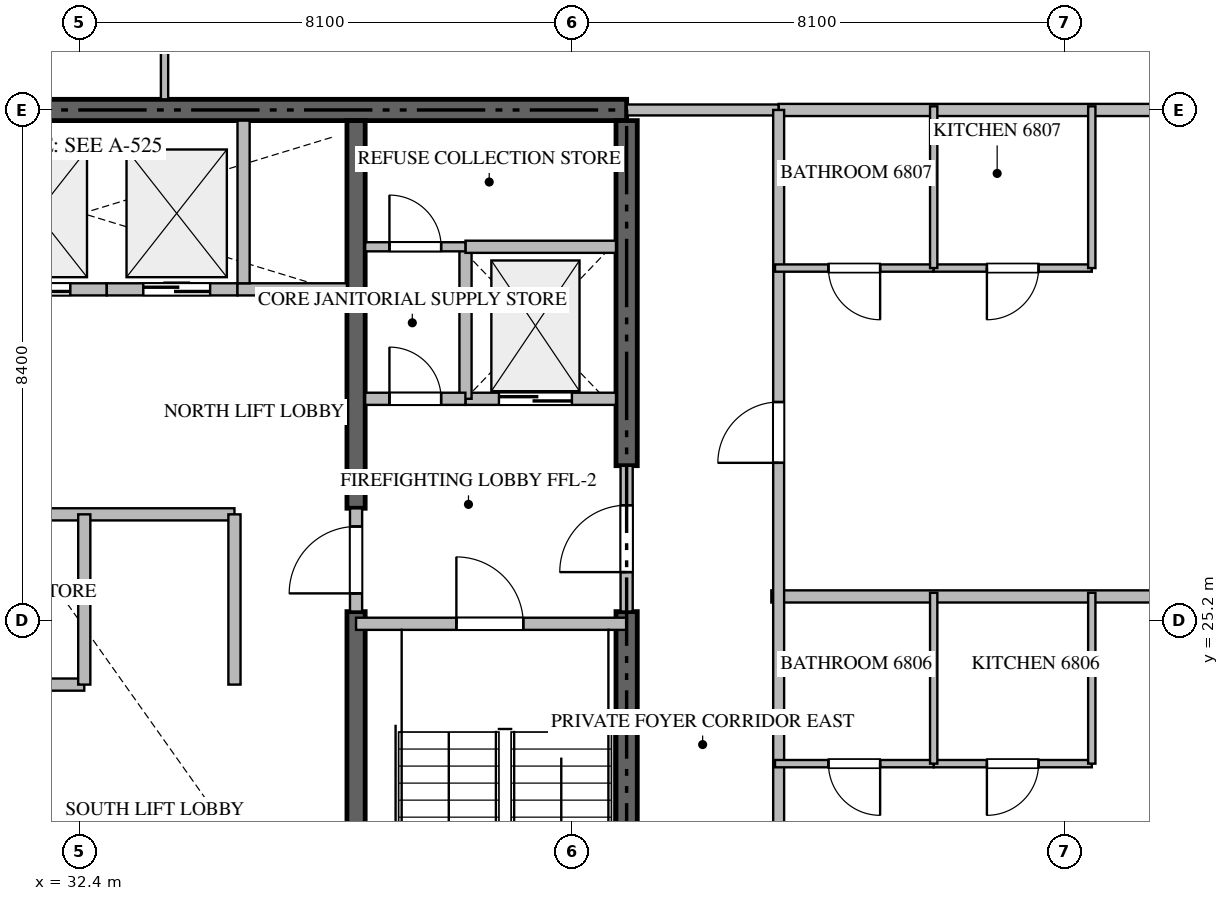
"""IFC4 building model, lengths in metres.
Left out: names, types, materials, properties, quantities, classifications, styles, units other than length and angle.
Written with IfcOpenShell. Run it as: python <this file> out.ifc"""

import sys

from ifc_helpers import new_model, si_unit, direction, frame, frame_2d, origin, place, context, subcontext, project, spatial, rectangle, extrude, source, transform, mapped, element, fill, save


model = new_model("IFC4")
c1 = context("Model", 3, precision=1e-05, world=origin(), true_north=direction((0.0, 1.0)))
c2 = subcontext(c1, "Body", "Model", "MODEL_VIEW")
j1 = project(units=[si_unit("LENGTHUNIT", "METRE"), si_unit("PLANEANGLEUNIT", "RADIAN")], contexts=[c1])
p1 = place(None, origin())
s1 = spatial("IfcSite", under=j1, at=p1, CompositionType="ELEMENT")
p2 = place(p1, origin())
s2 = spatial("IfcBuilding", under=s1, at=p2, CompositionType="ELEMENT")
p3 = place(p2, frame((0.0, 0.0, 272.05)))
s3 = spatial("IfcBuildingStorey", under=s2, at=p3, CompositionType="ELEMENT", Elevation=272.05)
p4 = place(p3, frame((41.4, 33.6, -0.26), z_axis=(0.0, 0.0, 1.0), x_axis=(-1.0, 0.0, 0.0)))
e1 = element("IfcWall", 1, at=p4, inside=s3, PredefinedType="SHEAR", context=c2, shape_type="SweptSolid", body=[
    extrude(rectangle(XDim=18.0, YDim=0.35, at=frame_2d((9.0, 0.0))), origin(), (0.0, 0.0, 1.0), 3.848),
])
p5 = place(p3, frame((41.4, 16.975, -0.26), z_axis=(0.0, 0.0, 1.0), x_axis=(0.0, 1.0, 0.0)))
e2 = element("IfcWall", 2, at=p5, inside=s3, PredefinedType="SHEAR", context=c2, shape_type="SweptSolid", body=[
    extrude(rectangle(XDim=8.375, YDim=0.35, at=frame_2d((4.188, 0.0))), origin(), (0.0, 0.0, 1.0), 3.848),
])
p6 = place(p3, frame((41.4, 27.75, -0.26), z_axis=(0.0, 0.0, 1.0), x_axis=(0.0, 1.0, 0.0)))
e3 = element("IfcWall", 3, at=p6, inside=s3, PredefinedType="SHEAR", context=c2, shape_type="SweptSolid", body=[
    extrude(rectangle(XDim=5.675, YDim=0.35, at=frame_2d((2.837, 0.0))), origin(), (0.0, 0.0, 1.0), 3.848),
])
p7 = place(p3, frame((36.95, 16.975, -0.26), z_axis=(0.0, 0.0, 1.0), x_axis=(0.0, 1.0, 0.0)))
e4 = element("IfcWall", 4, at=p7, inside=s3, PredefinedType="SHEAR", context=c2, shape_type="SweptSolid", body=[
    extrude(rectangle(XDim=8.375, YDim=0.3, at=frame_2d((4.188, 0.0))), origin(), (0.0, 0.0, 1.0), 3.848),
])
p8 = place(p3, frame((36.95, 27.05, -0.26), z_axis=(0.0, 0.0, 1.0), x_axis=(0.0, 1.0, 0.0)))
e5 = element("IfcWall", 5, at=p8, inside=s3, PredefinedType="SHEAR", context=c2, shape_type="SweptSolid", body=[
    extrude(rectangle(XDim=6.375, YDim=0.3, at=frame_2d((3.188, 0.0))), origin(), (0.0, 0.0, 1.0), 3.848),
])
p9 = place(p3, frame((36.95, 25.15, 0.0), z_axis=(0.0, 0.0, 1.0), x_axis=(1.0, 0.0, 0.0)))
e6 = element("IfcWall", 6, at=p9, inside=s3, PredefinedType="STANDARD", context=c2, shape_type="SweptSolid", body=[
    extrude(rectangle(XDim=4.45, YDim=0.2, at=frame_2d((2.225, 0.0))), origin(), (0.0, 0.0, 1.0), 3.59),
])
p10 = place(p9, frame((1.65, 0.0, 0.0)))
e7 = element("IfcOpeningElement", 7, at=p10, cuts=e6, PredefinedType="OPENING", context=c2, shape_type="SweptSolid", body=[
    extrude(rectangle(XDim=1.1, YDim=2.15, at=frame_2d((0.55, 1.075))), frame((0.0, 0.11, 0.0), z_axis=(0.0, -1.0, 0.0), x_axis=(1.0, 0.0, 0.0)), (0.0, 0.0, 1.0), 0.22),
])
p11 = place(p3, frame((38.75, 28.85, 0.0), z_axis=(0.0, 0.0, 1.0), x_axis=(1.0, 0.0, 0.0)))
e8 = element("IfcWall", 8, at=p11, inside=s3, PredefinedType="STANDARD", context=c2, shape_type="SweptSolid", body=[
    extrude(rectangle(XDim=2.475, YDim=0.2, at=frame_2d((1.238, 0.0))), origin(), (0.0, 0.0, 1.0), 3.59),
])
p12 = place(p11, frame((0.55, 0.0, 0.0)))
e9 = element("IfcOpeningElement", 9, at=p12, cuts=e8, PredefinedType="OPENING", context=c2, shape_type="SweptSolid", body=[
    extrude(rectangle(XDim=1.2, YDim=2.2, at=frame_2d((0.6, 1.1))), frame((0.0, 0.11, 0.0), z_axis=(0.0, -1.0, 0.0), x_axis=(1.0, 0.0, 0.0)), (0.0, 0.0, 1.0), 0.22),
])
p13 = place(p3, frame((30.55, 30.65, 0.0), z_axis=(0.0, 0.0, 1.0), x_axis=(1.0, 0.0, 0.0)))
e10 = element("IfcWall", 10, at=p13, inside=s3, PredefinedType="STANDARD", context=c2, shape_type="SweptSolid", body=[
    extrude(rectangle(XDim=2.3, YDim=0.2, at=frame_2d((1.15, 0.0))), origin(), (0.0, 0.0, 1.0), 3.59),
])
p14 = place(p13, frame((0.6, 0.0, 0.0)))
e11 = element("IfcOpeningElement", 11, at=p14, cuts=e10, PredefinedType="OPENING", context=c2, shape_type="SweptSolid", body=[
    extrude(rectangle(XDim=1.1, YDim=2.2, at=frame_2d((0.55, 1.1))), frame((0.0, 0.11, 0.0), z_axis=(0.0, -1.0, 0.0), x_axis=(1.0, 0.0, 0.0)), (0.0, 0.0, 1.0), 0.22),
])
p15 = place(p3, frame((32.85, 30.65, 0.0), z_axis=(0.0, 0.0, 1.0), x_axis=(1.0, 0.0, 0.0)))
e12 = element("IfcWall", 12, at=p15, inside=s3, PredefinedType="STANDARD", context=c2, shape_type="SweptSolid", body=[
    extrude(rectangle(XDim=2.15, YDim=0.2, at=frame_2d((1.075, 0.0))), origin(), (0.0, 0.0, 1.0), 3.59),
])
p16 = place(p15, frame((0.6, 0.0, 0.0)))
e13 = element("IfcOpeningElement", 13, at=p16, cuts=e12, PredefinedType="OPENING", context=c2, shape_type="SweptSolid", body=[
    extrude(rectangle(XDim=1.1, YDim=2.2, at=frame_2d((0.55, 1.1))), frame((0.0, 0.11, 0.0), z_axis=(0.0, -1.0, 0.0), x_axis=(1.0, 0.0, 0.0)), (0.0, 0.0, 1.0), 0.22),
])
p17 = place(p3, frame((35.0, 30.65, 0.0), z_axis=(0.0, 0.0, 1.0), x_axis=(1.0, 0.0, 0.0)))
e14 = element("IfcWall", 14, at=p17, inside=s3, PredefinedType="STANDARD", context=c2, shape_type="SweptSolid", body=[
    extrude(rectangle(XDim=1.8, YDim=0.2, at=frame_2d((0.9, 0.0))), origin(), (0.0, 0.0, 1.0), 3.59),
])
p18 = place(p3, frame((35.1, 30.75, 0.0), z_axis=(0.0, 0.0, 1.0), x_axis=(0.0, 1.0, 0.0)))
e15 = element("IfcWall", 15, at=p18, inside=s3, PredefinedType="STANDARD", context=c2, shape_type="SweptSolid", body=[
    extrude(rectangle(XDim=2.675, YDim=0.2, at=frame_2d((1.337, 0.0))), origin(), (0.0, 0.0, 1.0), 3.59),
])
p19 = place(p3, frame((38.75, 28.85, 0.0), z_axis=(0.0, 0.0, 1.0), x_axis=(0.0, 1.0, 0.0)))
e16 = element("IfcWall", 16, at=p19, inside=s3, PredefinedType="STANDARD", context=c2, shape_type="SweptSolid", body=[
    extrude(rectangle(XDim=2.5, YDim=0.2, at=frame_2d((1.25, 0.0))), origin(), (0.0, 0.0, 1.0), 3.59),
])
p20 = place(p3, frame((38.75, 31.35, 0.0), z_axis=(0.0, 0.0, 1.0), x_axis=(1.0, 0.0, 0.0)))
e17 = element("IfcWall", 17, at=p20, inside=s3, PredefinedType="STANDARD", context=c2, shape_type="SweptSolid", body=[
    extrude(rectangle(XDim=2.475, YDim=0.2, at=frame_2d((1.238, 0.0))), origin(), (0.0, 0.0, 1.0), 3.59),
])
p21 = place(p3, frame((37.1, 28.85, 0.0), z_axis=(0.0, 0.0, 1.0), x_axis=(1.0, 0.0, 0.0)))
e18 = element("IfcWall", 18, at=p21, inside=s3, PredefinedType="STANDARD", context=c2, shape_type="SweptSolid", body=[
    extrude(rectangle(XDim=1.648, YDim=0.2, at=frame_2d((0.824, 0.0))), origin(), (0.0, 0.0, 1.0), 3.59),
])
p22 = place(p21, frame((0.399, 0.0, 0.0)))
e19 = element("IfcOpeningElement", 19, at=p22, cuts=e18, PredefinedType="OPENING", context=c2, shape_type="SweptSolid", body=[
    extrude(rectangle(XDim=0.85, YDim=2.1, at=frame_2d((0.425, 1.05))), frame((0.0, 0.11, 0.0), z_axis=(0.0, -1.0, 0.0), x_axis=(1.0, 0.0, 0.0)), (0.0, 0.0, 1.0), 0.22),
])
p23 = place(p3, frame((41.4, 25.352, 0.0), z_axis=(0.0, 0.0, 1.0), x_axis=(0.0, 1.0, 0.0)))
e20 = element("IfcWall", 20, at=p23, inside=s3, PredefinedType="STANDARD", context=c2, shape_type="SweptSolid", body=[
    extrude(rectangle(XDim=2.396, YDim=0.2, at=frame_2d((1.198, 0.0))), origin(), (0.0, 0.0, 1.0), 3.59),
])
p24 = place(p23, frame((0.648, 0.0, 0.0)))
e21 = element("IfcOpeningElement", 21, at=p24, cuts=e20, PredefinedType="OPENING", context=c2, shape_type="SweptSolid", body=[
    extrude(rectangle(XDim=1.1, YDim=2.15, at=frame_2d((0.55, 1.075))), frame((0.0, 0.11, 0.0), z_axis=(0.0, -1.0, 0.0), x_axis=(1.0, 0.0, 0.0)), (0.0, 0.0, 1.0), 0.22),
])
p25 = place(p3, frame((36.95, 25.352, 0.0), z_axis=(0.0, 0.0, 1.0), x_axis=(0.0, 1.0, 0.0)))
e22 = element("IfcWall", 22, at=p25, inside=s3, PredefinedType="STANDARD", context=c2, shape_type="SweptSolid", body=[
    extrude(rectangle(XDim=1.696, YDim=0.2, at=frame_2d((0.848, 0.0))), origin(), (0.0, 0.0, 1.0), 3.59),
])
p26 = place(p25, frame((0.298, 0.0, 0.0)))
e23 = element("IfcOpeningElement", 23, at=p26, cuts=e22, PredefinedType="OPENING", context=c2, shape_type="SweptSolid", body=[
    extrude(rectangle(XDim=1.1, YDim=2.15, at=frame_2d((0.55, 1.075))), frame((0.0, 0.11, 0.0), z_axis=(0.0, -1.0, 0.0), x_axis=(1.0, 0.0, 0.0)), (0.0, 0.0, 1.0), 0.22),
])
p27 = place(p3, frame((37.1, 31.35, 0.0), z_axis=(0.0, 0.0, 1.0), x_axis=(1.0, 0.0, 0.0)))
e24 = element("IfcWall", 24, at=p27, inside=s3, PredefinedType="PARTITIONING", context=c2, shape_type="SweptSolid", body=[
    extrude(rectangle(XDim=1.648, YDim=0.15, at=frame_2d((0.824, 0.0))), origin(), (0.0, 0.0, 1.0), 3.59),
])
p28 = place(p27, frame((0.399, 0.0, 0.0)))
e25 = element("IfcOpeningElement", 25, at=p28, cuts=e24, PredefinedType="OPENING", context=c2, shape_type="SweptSolid", body=[
    extrude(rectangle(XDim=0.85, YDim=2.1, at=frame_2d((0.425, 1.05))), frame((0.0, 0.085, 0.0), z_axis=(0.0, -1.0, 0.0), x_axis=(1.0, 0.0, 0.0)), (0.0, 0.0, 1.0), 0.17),
])
p29 = place(p3, frame((28.0, 26.95, 0.0), z_axis=(0.0, 0.0, 1.0), x_axis=(1.0, 0.0, 0.0)))
e26 = element("IfcWall", 26, at=p29, inside=s3, PredefinedType="STANDARD", context=c2, shape_type="SweptSolid", body=[
    extrude(rectangle(XDim=6.95, YDim=0.2, at=frame_2d((3.475, 0.0))), origin(), (0.0, 0.0, 1.0), 3.59),
])
p30 = place(p3, frame((34.95, 24.15, 0.0), z_axis=(0.0, 0.0, 1.0), x_axis=(0.0, 1.0, 0.0)))
e27 = element("IfcWall", 27, at=p30, inside=s3, PredefinedType="STANDARD", context=c2, shape_type="SweptSolid", body=[
    extrude(rectangle(XDim=2.8, YDim=0.2, at=frame_2d((1.4, 0.0))), origin(), (0.0, 0.0, 1.0), 3.59),
])
p31 = place(p3, frame((28.0, 24.15, 0.0), z_axis=(0.0, 0.0, 1.0), x_axis=(1.0, 0.0, 0.0)))
e28 = element("IfcWall", 28, at=p31, inside=s3, PredefinedType="STANDARD", context=c2, shape_type="SweptSolid", body=[
    extrude(rectangle(XDim=4.48, YDim=0.2, at=frame_2d((2.24, 0.0))), origin(), (0.0, 0.0, 1.0), 3.59),
])
p32 = place(p31, frame((1.79, 0.0, 0.0)))
e29 = element("IfcOpeningElement", 29, at=p32, cuts=e28, PredefinedType="OPENING", context=c2, shape_type="SweptSolid", body=[
    extrude(rectangle(XDim=0.9, YDim=2.1, at=frame_2d((0.45, 1.05))), frame((0.0, 0.11, 0.0), z_axis=(0.0, -1.0, 0.0), x_axis=(1.0, 0.0, 0.0)), (0.0, 0.0, 1.0), 0.22),
])
p33 = place(p3, frame((32.48, 24.15, 0.0), z_axis=(0.0, 0.0, 1.0), x_axis=(0.0, 1.0, 0.0)))
e30 = element("IfcWall", 30, at=p33, inside=s3, PredefinedType="STANDARD", context=c2, shape_type="SweptSolid", body=[
    extrude(rectangle(XDim=2.8, YDim=0.2, at=frame_2d((1.4, 0.0))), origin(), (0.0, 0.0, 1.0), 3.59),
])
p34 = place(p3, frame((43.78, 25.6, 0.0), z_axis=(0.0, 0.0, 1.0), x_axis=(1.0, 0.0, 0.0)))
e31 = element("IfcWall", 31, at=p34, inside=s3, PredefinedType="PARTITIONING", context=c2, shape_type="SweptSolid", body=[
    extrude(rectangle(XDim=13.538, YDim=0.2, at=frame_2d((6.769, 0.0))), origin(), (0.0, 0.0, 1.0), 3.59),
])
p35 = place(p3, frame((43.9, 33.6, 0.0), z_axis=(0.0, 0.0, 1.0), x_axis=(1.0, 0.0, 0.0)))
e32 = element("IfcWall", 32, at=p35, inside=s3, PredefinedType="PARTITIONING", context=c2, shape_type="SweptSolid", body=[
    extrude(rectangle(XDim=13.418, YDim=0.2, at=frame_2d((6.709, 0.0))), origin(), (0.0, 0.0, 1.0), 3.59),
])
p36 = place(p3, frame((41.402, 33.6, 0.0), z_axis=(0.0, 0.0, 1.0), x_axis=(1.0, 0.0, 0.0)))
e33 = element("IfcWall", 33, at=p36, inside=s3, PredefinedType="PARTITIONING", context=c2, shape_type="SweptSolid", body=[
    extrude(rectangle(XDim=2.496, YDim=0.18, at=frame_2d((1.248, 0.0))), origin(), (0.0, 0.0, 1.0), 3.59),
])
p37 = place(p3, frame((43.9, 16.8, 0.0), z_axis=(0.0, 0.0, 1.0), x_axis=(0.0, 1.0, 0.0)))
e34 = element("IfcWall", 34, at=p37, inside=s3, PredefinedType="PARTITIONING", context=c2, shape_type="SweptSolid", body=[
    extrude(rectangle(XDim=16.8, YDim=0.18, at=frame_2d((8.4, 0.0))), origin(), (0.0, 0.0, 1.0), 3.59),
])
p38 = place(p37, frame((2.575, 0.0, 0.0)))
e35 = element("IfcOpeningElement", 35, at=p38, cuts=e34, PredefinedType="OPENING", context=c2, shape_type="SweptSolid", body=[
    extrude(rectangle(XDim=1.0, YDim=2.15, at=frame_2d((0.5, 1.075))), frame((0.0, 0.1, 0.0), z_axis=(0.0, -1.0, 0.0), x_axis=(1.0, 0.0, 0.0)), (0.0, 0.0, 1.0), 0.2),
])
p39 = place(p37, frame((10.997, 0.0, 0.0)))
e36 = element("IfcOpeningElement", 36, at=p39, cuts=e34, PredefinedType="OPENING", context=c2, shape_type="SweptSolid", body=[
    extrude(rectangle(XDim=1.0, YDim=2.15, at=frame_2d((0.5, 1.075))), frame((0.0, 0.1, 0.0), z_axis=(0.0, -1.0, 0.0), x_axis=(1.0, 0.0, 0.0)), (0.0, 0.0, 1.0), 0.2),
])
p40 = place(p3, frame((33.8, 35.748, 0.0), z_axis=(0.0, 0.0, 1.0), x_axis=(0.0, -1.0, 0.0)))
e37 = element("IfcWall", 37, at=p40, inside=s3, PredefinedType="PARTITIONING", context=c2, shape_type="SweptSolid", body=[
    extrude(rectangle(XDim=1.973, YDim=0.12, at=frame_2d((0.987, 0.0))), origin(), (0.0, 0.0, 1.0), 3.59),
])
p41 = place(p3, frame((49.05, 22.85, 0.0), z_axis=(0.0, 0.0, 1.0), x_axis=(-1.0, 0.0, 0.0)))
e38 = element("IfcWall", 38, at=p41, inside=s3, PredefinedType="PARTITIONING", context=c2, shape_type="SweptSolid", body=[
    extrude(rectangle(XDim=2.6, YDim=0.12, at=frame_2d((1.3, 0.0))), origin(), (0.0, 0.0, 1.0), 3.59),
])
p42 = place(p41, frame((0.875, 0.0, 0.0)))
e39 = element("IfcOpeningElement", 39, at=p42, cuts=e38, PredefinedType="OPENING", context=c2, shape_type="SweptSolid", body=[
    extrude(rectangle(XDim=0.85, YDim=2.1, at=frame_2d((0.425, 1.05))), frame((0.0, 0.07, 0.0), z_axis=(0.0, -1.0, 0.0), x_axis=(1.0, 0.0, 0.0)), (0.0, 0.0, 1.0), 0.14),
])
p43 = place(p3, frame((46.448, 22.85, 0.0), z_axis=(0.0, 0.0, 1.0), x_axis=(-1.0, 0.0, 0.0)))
e40 = element("IfcWall", 40, at=p43, inside=s3, PredefinedType="PARTITIONING", context=c2, shape_type="SweptSolid", body=[
    extrude(rectangle(XDim=2.608, YDim=0.12, at=frame_2d((1.304, 0.0))), origin(), (0.0, 0.0, 1.0), 3.59),
])
p44 = place(p43, frame((0.879, 0.0, 0.0)))
e41 = element("IfcOpeningElement", 41, at=p44, cuts=e40, PredefinedType="OPENING", context=c2, shape_type="SweptSolid", body=[
    extrude(rectangle(XDim=0.85, YDim=2.1, at=frame_2d((0.425, 1.05))), frame((0.0, 0.07, 0.0), z_axis=(0.0, -1.0, 0.0), x_axis=(1.0, 0.0, 0.0)), (0.0, 0.0, 1.0), 0.14),
])
for number, where, z_axis, x_axis in (
    (42, (46.45, 22.85, 0.0), (0.0, 0.0, 1.0), (0.0, 1.0, 0.0)),
    (43, (49.05, 22.85, 0.0), (0.0, 0.0, 1.0), (0.0, 1.0, 0.0)),
):
    element("IfcWall", number, at=place(p3, frame(where, z_axis=z_axis, x_axis=x_axis)), inside=s3, PredefinedType="PARTITIONING", context=c2, shape_type="SweptSolid", body=[
        extrude(rectangle(XDim=2.81, YDim=0.12, at=frame_2d((1.405, 0.0))), origin(), (0.0, 0.0, 1.0), 3.59),
    ])
p45 = place(p3, frame((49.05, 31.0, 0.0), z_axis=(0.0, 0.0, 1.0), x_axis=(-1.0, 0.0, 0.0)))
e44 = element("IfcWall", 44, at=p45, inside=s3, PredefinedType="PARTITIONING", context=c2, shape_type="SweptSolid", body=[
    extrude(rectangle(XDim=2.6, YDim=0.12, at=frame_2d((1.3, 0.0))), origin(), (0.0, 0.0, 1.0), 3.59),
])
p46 = place(p45, frame((0.875, 0.0, 0.0)))
e45 = element("IfcOpeningElement", 45, at=p46, cuts=e44, PredefinedType="OPENING", context=c2, shape_type="SweptSolid", body=[
    extrude(rectangle(XDim=0.85, YDim=2.1, at=frame_2d((0.425, 1.05))), frame((0.0, 0.07, 0.0), z_axis=(0.0, -1.0, 0.0), x_axis=(1.0, 0.0, 0.0)), (0.0, 0.0, 1.0), 0.14),
])
p47 = place(p3, frame((46.448, 31.0, 0.0), z_axis=(0.0, 0.0, 1.0), x_axis=(-1.0, 0.0, 0.0)))
e46 = element("IfcWall", 46, at=p47, inside=s3, PredefinedType="PARTITIONING", context=c2, shape_type="SweptSolid", body=[
    extrude(rectangle(XDim=2.608, YDim=0.12, at=frame_2d((1.304, 0.0))), origin(), (0.0, 0.0, 1.0), 3.59),
])
p48 = place(p47, frame((0.879, 0.0, 0.0)))
e47 = element("IfcOpeningElement", 47, at=p48, cuts=e46, PredefinedType="OPENING", context=c2, shape_type="SweptSolid", body=[
    extrude(rectangle(XDim=0.85, YDim=2.1, at=frame_2d((0.425, 1.05))), frame((0.0, 0.07, 0.0), z_axis=(0.0, -1.0, 0.0), x_axis=(1.0, 0.0, 0.0)), (0.0, 0.0, 1.0), 0.14),
])
for number, where, z_axis, x_axis in (
    (48, (46.45, 31.0, 0.0), (0.0, 0.0, 1.0), (0.0, 1.0, 0.0)),
    (49, (49.05, 31.0, 0.0), (0.0, 0.0, 1.0), (0.0, 1.0, 0.0)),
):
    element("IfcWall", number, at=place(p3, frame(where, z_axis=z_axis, x_axis=x_axis)), inside=s3, PredefinedType="PARTITIONING", context=c2, shape_type="SweptSolid", body=[
        extrude(rectangle(XDim=2.66, YDim=0.12, at=frame_2d((1.33, 0.0))), origin(), (0.0, 0.0, 1.0), 3.59),
    ])
m1 = source(origin(), c2, "Body", "SweptSolid", [
    extrude(rectangle(XDim=1.1, YDim=2.15, at=frame_2d((0.55, 1.075))), frame((0.0, 0.025, 0.0), z_axis=(0.0, -1.0, 0.0), x_axis=(1.0, 0.0, 0.0)), (0.0, 0.0, 1.0), 0.05),
])
p49 = place(p10, origin())
e50 = element("IfcDoor", 50, at=p49, inside=s3, OperationType="SINGLE_SWING_LEFT", PredefinedType="DOOR", context=c2, shape_type="MappedRepresentation", body=[
    mapped(m1, transform((0.0, 0.0, 0.0), scale=1.0)),
])
fill(e7, e50)
m2 = source(origin(), c2, "Body", "SweptSolid", [
    extrude(rectangle(XDim=1.2, YDim=2.2, at=frame_2d((0.6, 1.1))), frame((0.0, 0.025, 0.0), z_axis=(0.0, -1.0, 0.0), x_axis=(1.0, 0.0, 0.0)), (0.0, 0.0, 1.0), 0.05),
])
p50 = place(p12, origin())
e51 = element("IfcDoor", 51, at=p50, inside=s3, OperationType="DOUBLE_DOOR_SLIDING", PredefinedType="DOOR", context=c2, shape_type="MappedRepresentation", body=[
    mapped(m2, transform((0.0, 0.0, 0.0), scale=1.0)),
])
fill(e9, e51)
m3 = source(origin(), c2, "Body", "SweptSolid", [
    extrude(rectangle(XDim=1.1, YDim=2.2, at=frame_2d((0.55, 1.1))), frame((0.0, 0.025, 0.0), z_axis=(0.0, -1.0, 0.0), x_axis=(1.0, 0.0, 0.0)), (0.0, 0.0, 1.0), 0.05),
])
p51 = place(p14, origin())
e52 = element("IfcDoor", 52, at=p51, inside=s3, OperationType="DOUBLE_DOOR_SLIDING", PredefinedType="DOOR", context=c2, shape_type="MappedRepresentation", body=[
    mapped(m3, transform((0.0, 0.0, 0.0), scale=1.0)),
])
fill(e11, e52)
p52 = place(p16, origin())
e53 = element("IfcDoor", 53, at=p52, inside=s3, OperationType="DOUBLE_DOOR_SLIDING", PredefinedType="DOOR", context=c2, shape_type="MappedRepresentation", body=[
    mapped(m3, transform((0.0, 0.0, 0.0), scale=1.0)),
])
fill(e13, e53)
m4 = source(origin(), c2, "Body", "SweptSolid", [
    extrude(rectangle(XDim=0.85, YDim=2.1, at=frame_2d((0.425, 1.05))), frame((0.0, 0.025, 0.0), z_axis=(0.0, -1.0, 0.0), x_axis=(1.0, 0.0, 0.0)), (0.0, 0.0, 1.0), 0.05),
])
p53 = place(p22, origin())
e54 = element("IfcDoor", 54, at=p53, inside=s3, OperationType="SINGLE_SWING_LEFT", PredefinedType="DOOR", context=c2, shape_type="MappedRepresentation", body=[
    mapped(m4, transform((0.0, 0.0, 0.0), scale=1.0)),
])
fill(e19, e54)
p54 = place(p24, origin())
e55 = element("IfcDoor", 55, at=p54, inside=s3, OperationType="SINGLE_SWING_LEFT", PredefinedType="DOOR", context=c2, shape_type="MappedRepresentation", body=[
    mapped(m1, transform((0.0, 0.0, 0.0), scale=1.0)),
])
fill(e21, e55)
p55 = place(p26, origin())
e56 = element("IfcDoor", 56, at=p55, inside=s3, OperationType="SINGLE_SWING_LEFT", PredefinedType="DOOR", context=c2, shape_type="MappedRepresentation", body=[
    mapped(m1, transform((0.0, 0.0, 0.0), scale=1.0)),
])
fill(e23, e56)
p56 = place(p28, origin())
e57 = element("IfcDoor", 57, at=p56, inside=s3, OperationType="SINGLE_SWING_LEFT", PredefinedType="DOOR", context=c2, shape_type="MappedRepresentation", body=[
    mapped(m4, transform((0.0, 0.0, 0.0), scale=1.0)),
])
fill(e25, e57)
m5 = source(origin(), c2, "Body", "SweptSolid", [
    extrude(rectangle(XDim=1.0, YDim=2.15, at=frame_2d((0.5, 1.075))), frame((0.0, 0.025, 0.0), z_axis=(0.0, -1.0, 0.0), x_axis=(1.0, 0.0, 0.0)), (0.0, 0.0, 1.0), 0.05),
])
p57 = place(p39, origin())
e58 = element("IfcDoor", 58, at=p57, inside=s3, OperationType="SINGLE_SWING_LEFT", PredefinedType="DOOR", context=c2, shape_type="MappedRepresentation", body=[
    mapped(m5, transform((0.0, 0.0, 0.0), scale=1.0)),
])
fill(e36, e58)
p58 = place(p42, origin())
e59 = element("IfcDoor", 59, at=p58, inside=s3, OperationType="SINGLE_SWING_RIGHT", PredefinedType="DOOR", context=c2, shape_type="MappedRepresentation", body=[
    mapped(m4, transform((0.0, 0.0, 0.0), scale=1.0)),
])
fill(e39, e59)
p59 = place(p44, origin())
e60 = element("IfcDoor", 60, at=p59, inside=s3, OperationType="SINGLE_SWING_LEFT", PredefinedType="DOOR", context=c2, shape_type="MappedRepresentation", body=[
    mapped(m4, transform((0.0, 0.0, 0.0), scale=1.0)),
])
fill(e41, e60)
p60 = place(p46, origin())
e61 = element("IfcDoor", 61, at=p60, inside=s3, OperationType="SINGLE_SWING_RIGHT", PredefinedType="DOOR", context=c2, shape_type="MappedRepresentation", body=[
    mapped(m4, transform((0.0, 0.0, 0.0), scale=1.0)),
])
fill(e45, e61)
p61 = place(p48, origin())
e62 = element("IfcDoor", 62, at=p61, inside=s3, OperationType="SINGLE_SWING_LEFT", PredefinedType="DOOR", context=c2, shape_type="MappedRepresentation", body=[
    mapped(m4, transform((0.0, 0.0, 0.0), scale=1.0)),
])
fill(e47, e62)
save(model, sys.argv[1])
